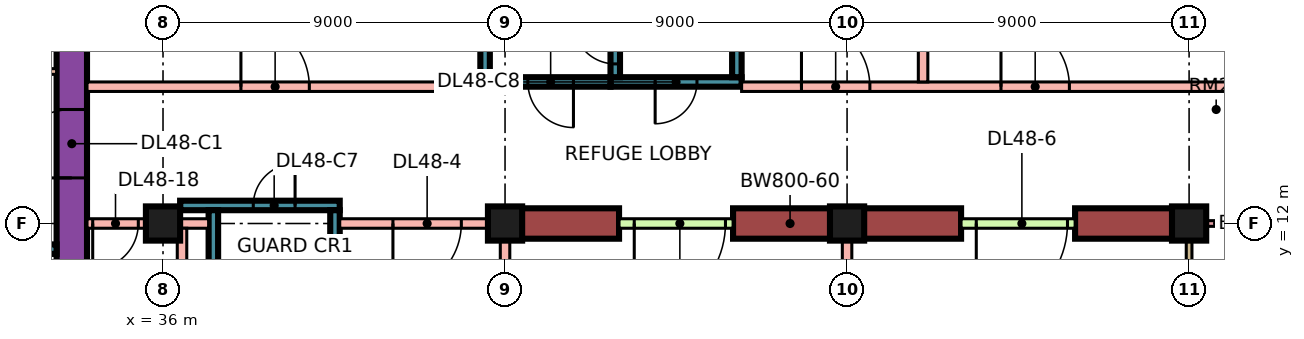
"""IFC4 building model, lengths in metres.
Left out: names, types, materials, properties, quantities, classifications, styles, units other than length and angle.
Written with IfcOpenShell. Run it as: python <this file> out.ifc"""

import sys

from ifc_helpers import new_model, si_unit, direction, frame, frame_2d, origin, origin_2d, place, context, subcontext, project, spatial, rectangle, extrude, element, fill, save


model = new_model("IFC4")
c1 = context("Model", 3, precision=1e-05, world=origin(), true_north=direction((0.0, 1.0)))
c2 = subcontext(c1, "Body", "Model", "MODEL_VIEW")
j1 = project(units=[si_unit("LENGTHUNIT", "METRE"), si_unit("PLANEANGLEUNIT", "RADIAN")], contexts=[c1])
p1 = place(None, origin())
s1 = spatial("IfcSite", under=j1, at=p1, CompositionType="ELEMENT")
p2 = place(p1, origin())
s2 = spatial("IfcBuilding", under=s1, at=p2, CompositionType="ELEMENT")
p3 = place(p2, frame((0.0, 0.0, 206.15)))
s3 = spatial("IfcBuildingStorey", under=s2, at=p3, CompositionType="ELEMENT", Elevation=206.15)
p4 = place(p3, frame((36.0, 12.0, 0.0), z_axis=(0.0, 0.0, 1.0), x_axis=(1.0, 0.0, 0.0)))
e1 = element("IfcColumn", 1, at=p4, inside=s3, PredefinedType="COLUMN", context=c2, shape_type="SweptSolid", body=[
    extrude(rectangle(XDim=0.9, YDim=0.9, at=origin_2d()), origin(), (0.0, 0.0, 1.0), 5.5),
])
p5 = place(p3, frame((45.0, 12.0, 0.0), z_axis=(0.0, 0.0, 1.0), x_axis=(1.0, 0.0, 0.0)))
e2 = element("IfcColumn", 2, at=p5, inside=s3, PredefinedType="COLUMN", context=c2, shape_type="SweptSolid", body=[
    extrude(rectangle(XDim=0.9, YDim=0.9, at=origin_2d()), origin(), (0.0, 0.0, 1.0), 5.5),
])
p6 = place(p3, frame((54.0, 12.0, 0.0), z_axis=(0.0, 0.0, 1.0), x_axis=(1.0, 0.0, 0.0)))
e3 = element("IfcColumn", 3, at=p6, inside=s3, PredefinedType="COLUMN", context=c2, shape_type="SweptSolid", body=[
    extrude(rectangle(XDim=0.9, YDim=0.9, at=origin_2d()), origin(), (0.0, 0.0, 1.0), 5.5),
])
p7 = place(p3, frame((63.0, 12.0, 0.0), z_axis=(0.0, 0.0, 1.0), x_axis=(1.0, 0.0, 0.0)))
e4 = element("IfcColumn", 4, at=p7, inside=s3, PredefinedType="COLUMN", context=c2, shape_type="SweptSolid", body=[
    extrude(rectangle(XDim=0.9, YDim=0.9, at=origin_2d()), origin(), (0.0, 0.0, 1.0), 5.5),
])
p8 = place(p3, frame((33.6, 7.8, 0.0), z_axis=(0.0, 0.0, 1.0), x_axis=(0.0, 1.0, 0.0)))
e5 = element("IfcWall", 5, at=p8, inside=s3, PredefinedType="SHEAR", context=c2, shape_type="SweptSolid", body=[
    extrude(rectangle(XDim=11.4, YDim=0.8, at=frame_2d((5.7, 0.0))), origin(), (0.0, 0.0, 1.0), 5.5),
])
p9 = place(p8, frame((5.4, 0.0, 0.0)))
e6 = element("IfcOpeningElement", 6, at=p9, cuts=e5, PredefinedType="OPENING", context=c2, shape_type="SweptSolid", body=[
    extrude(rectangle(XDim=1.8, YDim=2.4, at=frame_2d((0.9, 1.2))), frame((0.0, 0.41, 0.0), z_axis=(0.0, -1.0, 0.0), x_axis=(1.0, 0.0, 0.0)), (0.0, 0.0, 1.0), 0.82),
])
p10 = place(p3, frame((13.45, 11.325, 0.0), z_axis=(0.0, 0.0, 1.0), x_axis=(1.0, 0.0, 0.0)))
e7 = element("IfcWall", 7, at=p10, inside=s3, PredefinedType="SHEAR", context=c2, shape_type="SweptSolid", body=[
    extrude(rectangle(XDim=19.75, YDim=0.25, at=frame_2d((9.875, 0.0))), origin(), (0.0, 0.0, 1.0), 5.5),
])
p11 = place(p10, frame((11.65, 0.0, 0.0)))
e8 = element("IfcOpeningElement", 8, at=p11, cuts=e7, PredefinedType="OPENING", context=c2, shape_type="SweptSolid", body=[
    extrude(rectangle(XDim=1.2, YDim=2.2, at=frame_2d((0.6, 1.1))), frame((0.0, 0.135, 0.0), z_axis=(0.0, -1.0, 0.0), x_axis=(1.0, 0.0, 0.0)), (0.0, 0.0, 1.0), 0.27),
])
p12 = place(p10, frame((14.4, 0.0, 0.0)))
e9 = element("IfcOpeningElement", 9, at=p12, cuts=e7, PredefinedType="OPENING", context=c2, shape_type="SweptSolid", body=[
    extrude(rectangle(XDim=1.2, YDim=2.2, at=frame_2d((0.6, 1.1))), frame((0.0, 0.135, 0.0), z_axis=(0.0, -1.0, 0.0), x_axis=(1.0, 0.0, 0.0)), (0.0, 0.0, 1.0), 0.27),
])
p13 = place(p10, frame((17.15, 0.0, 0.0)))
e10 = element("IfcOpeningElement", 10, at=p13, cuts=e7, PredefinedType="OPENING", context=c2, shape_type="SweptSolid", body=[
    extrude(rectangle(XDim=1.2, YDim=2.2, at=frame_2d((0.6, 1.1))), frame((0.0, 0.135, 0.0), z_axis=(0.0, -1.0, 0.0), x_axis=(1.0, 0.0, 0.0)), (0.0, 0.0, 1.0), 0.27),
])
p14 = place(p10, frame((1.55, 0.0, 0.0)))
e11 = element("IfcOpeningElement", 11, at=p14, cuts=e7, PredefinedType="OPENING", context=c2, shape_type="SweptSolid", body=[
    extrude(rectangle(XDim=0.9, YDim=2.1, at=frame_2d((0.45, 1.05))), frame((0.0, 0.135, 0.0), z_axis=(0.0, -1.0, 0.0), x_axis=(1.0, 0.0, 0.0)), (0.0, 0.0, 1.0), 0.27),
])
p15 = place(p10, frame((5.05, 0.0, 0.0)))
e12 = element("IfcOpeningElement", 12, at=p15, cuts=e7, PredefinedType="OPENING", context=c2, shape_type="SweptSolid", body=[
    extrude(rectangle(XDim=0.9, YDim=2.1, at=frame_2d((0.45, 1.05))), frame((0.0, 0.135, 0.0), z_axis=(0.0, -1.0, 0.0), x_axis=(1.0, 0.0, 0.0)), (0.0, 0.0, 1.0), 0.27),
])
p16 = place(p10, frame((8.425, 0.0, 0.0)))
e13 = element("IfcOpeningElement", 13, at=p16, cuts=e7, PredefinedType="OPENING", context=c2, shape_type="SweptSolid", body=[
    extrude(rectangle(XDim=0.9, YDim=2.1, at=frame_2d((0.45, 1.05))), frame((0.0, 0.135, 0.0), z_axis=(0.0, -1.0, 0.0), x_axis=(1.0, 0.0, 0.0)), (0.0, 0.0, 1.0), 0.27),
])
p17 = place(p3, frame((36.45, 12.475, 0.0), z_axis=(0.0, 0.0, 1.0), x_axis=(1.0, 0.0, 0.0)))
e14 = element("IfcWall", 14, at=p17, inside=s3, PredefinedType="SHEAR", context=c2, shape_type="SweptSolid", body=[
    extrude(rectangle(XDim=4.2, YDim=0.25, at=frame_2d((2.1, 0.0))), origin(), (0.0, 0.0, 1.0), 5.5),
])
p18 = place(p17, frame((1.925, 0.0, 0.0)))
e15 = element("IfcOpeningElement", 15, at=p18, cuts=e14, PredefinedType="OPENING", context=c2, shape_type="SweptSolid", body=[
    extrude(rectangle(XDim=1.1, YDim=2.2, at=frame_2d((0.55, 1.1))), frame((0.0, 0.135, 0.0), z_axis=(0.0, -1.0, 0.0), x_axis=(1.0, 0.0, 0.0)), (0.0, 0.0, 1.0), 0.27),
])
for number, where, z_axis, x_axis in (
    (16, (37.325, 5.85, 0.0), (0.0, 0.0, 1.0), (0.0, 1.0, 0.0)),
    (17, (40.525, 5.85, 0.0), (0.0, 0.0, 1.0), (0.0, 1.0, 0.0)),
):
    element("IfcWall", number, at=place(p3, frame(where, z_axis=z_axis, x_axis=x_axis)), inside=s3, PredefinedType="SHEAR", context=c2, shape_type="SweptSolid", body=[
        extrude(rectangle(XDim=6.5, YDim=0.25, at=frame_2d((3.25, 0.0))), origin(), (0.0, 0.0, 1.0), 5.5),
    ])
p19 = place(p3, frame((47.775, 15.725, 0.0), z_axis=(0.0, 0.0, 1.0), x_axis=(1.0, 0.0, 0.0)))
e18 = element("IfcWall", 18, at=p19, inside=s3, PredefinedType="SHEAR", context=c2, shape_type="SweptSolid", body=[
    extrude(rectangle(XDim=3.45, YDim=0.25, at=frame_2d((1.725, 0.0))), origin(), (0.0, 0.0, 1.0), 5.5),
])
p20 = place(p19, frame((1.175, 0.0, 0.0)))
e19 = element("IfcOpeningElement", 19, at=p20, cuts=e18, PredefinedType="OPENING", context=c2, shape_type="SweptSolid", body=[
    extrude(rectangle(XDim=1.1, YDim=2.2, at=frame_2d((0.55, 1.1))), frame((0.0, 0.135, 0.0), z_axis=(0.0, -1.0, 0.0), x_axis=(1.0, 0.0, 0.0)), (0.0, 0.0, 1.0), 0.27),
])
p21 = place(p3, frame((47.9, 15.85, 0.0), z_axis=(0.0, 0.0, 1.0), x_axis=(0.0, 1.0, 0.0)))
e20 = element("IfcWall", 20, at=p21, inside=s3, PredefinedType="SHEAR", context=c2, shape_type="SweptSolid", body=[
    extrude(rectangle(XDim=6.5, YDim=0.25, at=frame_2d((3.25, 0.0))), origin(), (0.0, 0.0, 1.0), 5.5),
])
p22 = place(p21, frame((0.35, 0.0, 0.0)))
e21 = element("IfcOpeningElement", 21, at=p22, cuts=e20, PredefinedType="OPENING", context=c2, shape_type="SweptSolid", body=[
    extrude(rectangle(XDim=1.1, YDim=2.2, at=frame_2d((0.55, 1.1))), frame((0.0, 0.135, 0.0), z_axis=(0.0, -1.0, 0.0), x_axis=(1.0, 0.0, 0.0)), (0.0, 0.0, 1.0), 0.27),
])
p23 = place(p3, frame((51.1, 15.85, 0.0), z_axis=(0.0, 0.0, 1.0), x_axis=(0.0, 1.0, 0.0)))
e22 = element("IfcWall", 22, at=p23, inside=s3, PredefinedType="SHEAR", context=c2, shape_type="SweptSolid", body=[
    extrude(rectangle(XDim=6.5, YDim=0.25, at=frame_2d((3.25, 0.0))), origin(), (0.0, 0.0, 1.0), 5.5),
])
p24 = place(p3, frame((44.35, 15.725, 0.0), z_axis=(0.0, 0.0, 1.0), x_axis=(1.0, 0.0, 0.0)))
e23 = element("IfcWall", 23, at=p24, inside=s3, PredefinedType="SHEAR", context=c2, shape_type="SweptSolid", body=[
    extrude(rectangle(XDim=3.425, YDim=0.25, at=frame_2d((1.712, 0.0))), origin(), (0.0, 0.0, 1.0), 5.5),
])
p25 = place(p24, frame((1.25, 0.0, 0.0)))
e24 = element("IfcOpeningElement", 24, at=p25, cuts=e23, PredefinedType="OPENING", context=c2, shape_type="SweptSolid", body=[
    extrude(rectangle(XDim=1.2, YDim=2.2, at=frame_2d((0.6, 1.1))), frame((0.0, 0.135, 0.0), z_axis=(0.0, -1.0, 0.0), x_axis=(1.0, 0.0, 0.0)), (0.0, 0.0, 1.0), 0.27),
])
p26 = place(p3, frame((44.475, 15.85, 0.0), z_axis=(0.0, 0.0, 1.0), x_axis=(0.0, 1.0, 0.0)))
e25 = element("IfcWall", 25, at=p26, inside=s3, PredefinedType="SHEAR", context=c2, shape_type="SweptSolid", body=[
    extrude(rectangle(XDim=6.5, YDim=0.25, at=frame_2d((3.25, 0.0))), origin(), (0.0, 0.0, 1.0), 5.5),
])
p27 = place(p26, frame((1.75, 0.0, 0.0)))
e26 = element("IfcOpeningElement", 26, at=p27, cuts=e25, PredefinedType="OPENING", context=c2, shape_type="SweptSolid", body=[
    extrude(rectangle(XDim=1.1, YDim=2.2, at=frame_2d((0.55, 1.1))), frame((0.0, 0.135, 0.0), z_axis=(0.0, -1.0, 0.0), x_axis=(1.0, 0.0, 0.0)), (0.0, 0.0, 1.0), 0.27),
])
p28 = place(p26, frame((4.3, 0.0, 0.0)))
e27 = element("IfcOpeningElement", 27, at=p28, cuts=e25, PredefinedType="OPENING", context=c2, shape_type="SweptSolid", body=[
    extrude(rectangle(XDim=1.1, YDim=2.2, at=frame_2d((0.55, 1.1))), frame((0.0, 0.135, 0.0), z_axis=(0.0, -1.0, 0.0), x_axis=(1.0, 0.0, 0.0)), (0.0, 0.0, 1.0), 0.27),
])
e28 = element("IfcWall", 28, at=p5, inside=s3, PredefinedType="SHEAR", context=c2, shape_type="SweptSolid", body=[
    extrude(rectangle(XDim=3.0, YDim=0.8, at=frame_2d((1.5, 0.0))), origin(), (0.0, 0.0, 1.0), 5.1),
])
p29 = place(p3, frame((51.0, 12.0, 0.0), z_axis=(0.0, 0.0, 1.0), x_axis=(1.0, 0.0, 0.0)))
e29 = element("IfcWall", 29, at=p29, inside=s3, PredefinedType="SHEAR", context=c2, shape_type="SweptSolid", body=[
    extrude(rectangle(XDim=3.0, YDim=0.8, at=frame_2d((1.5, 0.0))), origin(), (0.0, 0.0, 1.0), 5.1),
])
e30 = element("IfcWall", 30, at=p6, inside=s3, PredefinedType="SHEAR", context=c2, shape_type="SweptSolid", body=[
    extrude(rectangle(XDim=3.0, YDim=0.8, at=frame_2d((1.5, 0.0))), origin(), (0.0, 0.0, 1.0), 5.1),
])
p30 = place(p3, frame((60.0, 12.0, 0.0), z_axis=(0.0, 0.0, 1.0), x_axis=(1.0, 0.0, 0.0)))
e31 = element("IfcWall", 31, at=p30, inside=s3, PredefinedType="SHEAR", context=c2, shape_type="SweptSolid", body=[
    extrude(rectangle(XDim=3.0, YDim=0.8, at=frame_2d((1.5, 0.0))), origin(), (0.0, 0.0, 1.0), 5.1),
])
p31 = place(p3, frame((63.0, 1.575, 0.0), z_axis=(0.0, 0.0, 1.0), x_axis=(0.0, 1.0, 0.0)))
e32 = element("IfcWall", 32, at=p31, inside=s3, PredefinedType="SOLIDWALL", context=c2, shape_type="SweptSolid", body=[
    extrude(rectangle(XDim=10.35, YDim=0.15, at=frame_2d((5.175, 0.0))), origin(), (0.0, 0.0, 1.0), 5.1),
])
p32 = place(p31, frame((3.438, 0.0, 0.45)))
e33 = element("IfcOpeningElement", 33, at=p32, cuts=e32, PredefinedType="OPENING", context=c2, shape_type="SweptSolid", body=[
    extrude(rectangle(XDim=3.0, YDim=3.6, at=frame_2d((1.5, 1.8))), frame((0.0, 0.085, 0.0), z_axis=(0.0, -1.0, 0.0), x_axis=(1.0, 0.0, 0.0)), (0.0, 0.0, 1.0), 0.17),
])
p33 = place(p3, frame((64.5, 12.0, 0.0), z_axis=(0.0, 0.0, 1.0), x_axis=(-1.0, 0.0, 0.0)))
e34 = element("IfcWall", 34, at=p33, inside=s3, PredefinedType="SOLIDWALL", context=c2, shape_type="SweptSolid", body=[
    extrude(rectangle(XDim=1.5, YDim=0.15, at=frame_2d((0.75, 0.0))), origin(), (0.0, 0.0, 1.0), 5.1),
])
p34 = place(p3, frame((31.2, 16.0, 0.0), z_axis=(0.0, 0.0, 1.0), x_axis=(1.0, 0.0, 0.0)))
e35 = element("IfcWall", 35, at=p34, inside=s3, PredefinedType="PARTITIONING", context=c2, shape_type="SweptSolid", body=[
    extrude(rectangle(XDim=2.0, YDim=0.15, at=frame_2d((1.0, 0.0))), origin(), (0.0, 0.0, 1.0), 5.1),
])
p35 = place(p3, frame((34.0, 12.0, 0.0), z_axis=(0.0, 0.0, 1.0), x_axis=(1.0, 0.0, 0.0)))
e36 = element("IfcWall", 36, at=p35, inside=s3, PredefinedType="PARTITIONING", context=c2, shape_type="SweptSolid", body=[
    extrude(rectangle(XDim=3.2, YDim=0.25, at=frame_2d((1.6, 0.0))), origin(), (0.0, 0.0, 1.0), 5.1),
])
p36 = place(p35, frame((0.15, 0.0, 0.0)))
e37 = element("IfcOpeningElement", 37, at=p36, cuts=e36, PredefinedType="OPENING", context=c2, shape_type="SweptSolid", body=[
    extrude(rectangle(XDim=1.2, YDim=2.1, at=frame_2d((0.6, 1.05))), frame((0.0, 0.135, 0.0), z_axis=(0.0, -1.0, 0.0), x_axis=(1.0, 0.0, 0.0)), (0.0, 0.0, 1.0), 0.27),
])
p37 = place(p3, frame((34.0, 15.6, 0.0), z_axis=(0.0, 0.0, 1.0), x_axis=(1.0, 0.0, 0.0)))
e38 = element("IfcWall", 38, at=p37, inside=s3, PredefinedType="PARTITIONING", context=c2, shape_type="SweptSolid", body=[
    extrude(rectangle(XDim=10.35, YDim=0.25, at=frame_2d((5.175, 0.0))), origin(), (0.0, 0.0, 1.0), 5.1),
])
p38 = place(p37, frame((4.05, 0.0, 0.0)))
e39 = element("IfcOpeningElement", 39, at=p38, cuts=e38, PredefinedType="OPENING", context=c2, shape_type="SweptSolid", body=[
    extrude(rectangle(XDim=1.8, YDim=2.1, at=frame_2d((0.9, 1.05))), frame((0.0, 0.135, 0.0), z_axis=(0.0, -1.0, 0.0), x_axis=(1.0, 0.0, 0.0)), (0.0, 0.0, 1.0), 0.27),
])
p39 = place(p3, frame((36.5, 6.875, 0.0), z_axis=(0.0, 0.0, 1.0), x_axis=(0.0, 1.0, 0.0)))
e40 = element("IfcWall", 40, at=p39, inside=s3, PredefinedType="PARTITIONING", context=c2, shape_type="SweptSolid", body=[
    extrude(rectangle(XDim=5.0, YDim=0.25, at=frame_2d((2.5, 0.0))), origin(), (0.0, 0.0, 1.0), 5.1),
])
p40 = place(p3, frame((40.65, 12.0, 0.0), z_axis=(0.0, 0.0, 1.0), x_axis=(1.0, 0.0, 0.0)))
e41 = element("IfcWall", 41, at=p40, inside=s3, PredefinedType="PARTITIONING", context=c2, shape_type="SweptSolid", body=[
    extrude(rectangle(XDim=4.225, YDim=0.25, at=frame_2d((2.113, 0.0))), origin(), (0.0, 0.0, 1.0), 5.1),
])
p41 = place(p40, frame((1.4, 0.0, 0.0)))
e42 = element("IfcOpeningElement", 42, at=p41, cuts=e41, PredefinedType="OPENING", context=c2, shape_type="SweptSolid", body=[
    extrude(rectangle(XDim=1.8, YDim=2.1, at=frame_2d((0.9, 1.05))), frame((0.0, 0.135, 0.0), z_axis=(0.0, -1.0, 0.0), x_axis=(1.0, 0.0, 0.0)), (0.0, 0.0, 1.0), 0.27),
])
p42 = place(p3, frame((45.0, 0.0, 0.0), z_axis=(0.0, 0.0, 1.0), x_axis=(0.0, 1.0, 0.0)))
e43 = element("IfcWall", 43, at=p42, inside=s3, PredefinedType="PARTITIONING", context=c2, shape_type="SweptSolid", body=[
    extrude(rectangle(XDim=12.125, YDim=0.25, at=frame_2d((6.062, 0.0))), origin(), (0.0, 0.0, 1.0), 5.1),
])
p43 = place(p3, frame((47.999, 12.0, 0.0), z_axis=(0.0, 0.0, 1.0), x_axis=(1.0, 0.0, 0.0)))
e44 = element("IfcWall", 44, at=p43, inside=s3, PredefinedType="PARTITIONING", context=c2, shape_type="SweptSolid", body=[
    extrude(rectangle(XDim=3.002, YDim=0.25, at=frame_2d((1.501, 0.0))), origin(), (0.0, 0.0, 1.0), 3.05),
])
p44 = place(p43, frame((0.401, 0.0, 0.0)))
e45 = element("IfcOpeningElement", 45, at=p44, cuts=e44, PredefinedType="OPENING", context=c2, shape_type="SweptSolid", body=[
    extrude(rectangle(XDim=2.4, YDim=2.1, at=frame_2d((1.2, 1.05))), frame((0.0, 0.135, 0.0), z_axis=(0.0, -1.0, 0.0), x_axis=(1.0, 0.0, 0.0)), (0.0, 0.0, 1.0), 0.27),
])
p45 = place(p3, frame((51.225, 15.6, 0.0), z_axis=(0.0, 0.0, 1.0), x_axis=(1.0, 0.0, 0.0)))
e46 = element("IfcWall", 46, at=p45, inside=s3, PredefinedType="PARTITIONING", context=c2, shape_type="SweptSolid", body=[
    extrude(rectangle(XDim=13.125, YDim=0.25, at=frame_2d((6.562, 0.0))), origin(), (0.0, 0.0, 1.0), 5.1),
])
p46 = place(p45, frame((1.575, 0.0, 0.0)))
e47 = element("IfcOpeningElement", 47, at=p46, cuts=e46, PredefinedType="OPENING", context=c2, shape_type="SweptSolid", body=[
    extrude(rectangle(XDim=1.8, YDim=2.1, at=frame_2d((0.9, 1.05))), frame((0.0, 0.135, 0.0), z_axis=(0.0, -1.0, 0.0), x_axis=(1.0, 0.0, 0.0)), (0.0, 0.0, 1.0), 0.27),
])
p47 = place(p45, frame((6.825, 0.0, 0.0)))
e48 = element("IfcOpeningElement", 48, at=p47, cuts=e46, PredefinedType="OPENING", context=c2, shape_type="SweptSolid", body=[
    extrude(rectangle(XDim=1.8, YDim=2.1, at=frame_2d((0.9, 1.05))), frame((0.0, 0.135, 0.0), z_axis=(0.0, -1.0, 0.0), x_axis=(1.0, 0.0, 0.0)), (0.0, 0.0, 1.0), 0.27),
])
p48 = place(p3, frame((54.0, 0.074, 0.0), z_axis=(0.0, 0.0, 1.0), x_axis=(0.0, 1.0, 0.0)))
e49 = element("IfcWall", 49, at=p48, inside=s3, PredefinedType="PARTITIONING", context=c2, shape_type="SweptSolid", body=[
    extrude(rectangle(XDim=11.527, YDim=0.25, at=frame_2d((5.764, 0.0))), origin(), (0.0, 0.0, 1.0), 5.1),
])
p49 = place(p3, frame((56.0, 15.725, 0.0), z_axis=(0.0, 0.0, 1.0), x_axis=(0.0, 1.0, 0.0)))
e50 = element("IfcWall", 50, at=p49, inside=s3, PredefinedType="PARTITIONING", context=c2, shape_type="SweptSolid", body=[
    extrude(rectangle(XDim=8.201, YDim=0.25, at=frame_2d((4.101, 0.0))), origin(), (0.0, 0.0, 1.0), 5.1),
])
p50 = place(p3, frame((56.999, 12.0, 0.0), z_axis=(0.0, 0.0, 1.0), x_axis=(1.0, 0.0, 0.0)))
e51 = element("IfcWall", 51, at=p50, inside=s3, PredefinedType="PARTITIONING", context=c2, shape_type="SweptSolid", body=[
    extrude(rectangle(XDim=3.002, YDim=0.25, at=frame_2d((1.501, 0.0))), origin(), (0.0, 0.0, 1.0), 3.05),
])
p51 = place(p50, frame((0.401, 0.0, 0.0)))
e52 = element("IfcOpeningElement", 52, at=p51, cuts=e51, PredefinedType="OPENING", context=c2, shape_type="SweptSolid", body=[
    extrude(rectangle(XDim=2.4, YDim=2.1, at=frame_2d((1.2, 1.05))), frame((0.0, 0.135, 0.0), z_axis=(0.0, -1.0, 0.0), x_axis=(1.0, 0.0, 0.0)), (0.0, 0.0, 1.0), 0.27),
])
p52 = place(p9, origin())
e53 = element("IfcDoor", 53, at=p52, inside=s3, OperationType="DOUBLE_DOOR_SINGLE_SWING", PredefinedType="DOOR", context=c2, shape_type="SweptSolid", body=[
    extrude(rectangle(XDim=1.8, YDim=2.4, at=frame_2d((0.9, 1.2))), frame((0.0, 0.025, 0.0), z_axis=(0.0, -1.0, 0.0), x_axis=(1.0, 0.0, 0.0)), (0.0, 0.0, 1.0), 0.05),
])
fill(e6, e53)
p53 = place(p18, frame((1.1, 0.0, 0.0), z_axis=(0.0, 0.0, 1.0), x_axis=(-1.0, 0.0, 0.0)))
e54 = element("IfcDoor", 54, at=p53, inside=s3, OperationType="SINGLE_SWING_RIGHT", PredefinedType="DOOR", context=c2, shape_type="SweptSolid", body=[
    extrude(rectangle(XDim=1.1, YDim=2.2, at=frame_2d((0.55, 1.1))), frame((0.0, 0.025, 0.0), z_axis=(0.0, -1.0, 0.0), x_axis=(1.0, 0.0, 0.0)), (0.0, 0.0, 1.0), 0.05),
])
fill(e15, e54)
p54 = place(p20, frame((1.1, 0.0, 0.0), z_axis=(0.0, 0.0, 1.0), x_axis=(-1.0, 0.0, 0.0)))
e55 = element("IfcDoor", 55, at=p54, inside=s3, OperationType="SINGLE_SWING_LEFT", PredefinedType="DOOR", context=c2, shape_type="SweptSolid", body=[
    extrude(rectangle(XDim=1.1, YDim=2.2, at=frame_2d((0.55, 1.1))), frame((0.0, 0.025, 0.0), z_axis=(0.0, -1.0, 0.0), x_axis=(1.0, 0.0, 0.0)), (0.0, 0.0, 1.0), 0.05),
])
fill(e19, e55)
p55 = place(p25, origin())
e56 = element("IfcDoor", 56, at=p55, inside=s3, OperationType="SINGLE_SWING_RIGHT", PredefinedType="DOOR", context=c2, shape_type="SweptSolid", body=[
    extrude(rectangle(XDim=1.2, YDim=2.2, at=frame_2d((0.6, 1.1))), frame((0.0, 0.025, 0.0), z_axis=(0.0, -1.0, 0.0), x_axis=(1.0, 0.0, 0.0)), (0.0, 0.0, 1.0), 0.05),
])
fill(e24, e56)
p56 = place(p22, frame((1.1, 0.0, 0.0), z_axis=(0.0, 0.0, 1.0), x_axis=(-1.0, 0.0, 0.0)))
e57 = element("IfcDoor", 57, at=p56, inside=s3, OperationType="SINGLE_SWING_RIGHT", PredefinedType="DOOR", context=c2, shape_type="SweptSolid", body=[
    extrude(rectangle(XDim=1.1, YDim=2.2, at=frame_2d((0.55, 1.1))), frame((0.0, 0.025, 0.0), z_axis=(0.0, -1.0, 0.0), x_axis=(1.0, 0.0, 0.0)), (0.0, 0.0, 1.0), 0.05),
])
fill(e21, e57)
p57 = place(p38, origin())
e58 = element("IfcDoor", 58, at=p57, inside=s3, OperationType="DOUBLE_DOOR_SINGLE_SWING", PredefinedType="DOOR", context=c2, shape_type="SweptSolid", body=[
    extrude(rectangle(XDim=1.8, YDim=2.1, at=frame_2d((0.9, 1.05))), frame((0.0, 0.025, 0.0), z_axis=(0.0, -1.0, 0.0), x_axis=(1.0, 0.0, 0.0)), (0.0, 0.0, 1.0), 0.05),
])
fill(e39, e58)
p58 = place(p46, origin())
e59 = element("IfcDoor", 59, at=p58, inside=s3, OperationType="DOUBLE_DOOR_SINGLE_SWING", PredefinedType="DOOR", context=c2, shape_type="SweptSolid", body=[
    extrude(rectangle(XDim=1.8, YDim=2.1, at=frame_2d((0.9, 1.05))), frame((0.0, 0.025, 0.0), z_axis=(0.0, -1.0, 0.0), x_axis=(1.0, 0.0, 0.0)), (0.0, 0.0, 1.0), 0.05),
])
fill(e47, e59)
p59 = place(p47, origin())
e60 = element("IfcDoor", 60, at=p59, inside=s3, OperationType="DOUBLE_DOOR_SINGLE_SWING", PredefinedType="DOOR", context=c2, shape_type="SweptSolid", body=[
    extrude(rectangle(XDim=1.8, YDim=2.1, at=frame_2d((0.9, 1.05))), frame((0.0, 0.025, 0.0), z_axis=(0.0, -1.0, 0.0), x_axis=(1.0, 0.0, 0.0)), (0.0, 0.0, 1.0), 0.05),
])
fill(e48, e60)
p60 = place(p41, frame((1.8, 0.0, 0.0), z_axis=(0.0, 0.0, 1.0), x_axis=(-1.0, 0.0, 0.0)))
e61 = element("IfcDoor", 61, at=p60, inside=s3, OperationType="DOUBLE_DOOR_SINGLE_SWING", PredefinedType="DOOR", context=c2, shape_type="SweptSolid", body=[
    extrude(rectangle(XDim=1.8, YDim=2.1, at=frame_2d((0.9, 1.05))), frame((0.0, 0.025, 0.0), z_axis=(0.0, -1.0, 0.0), x_axis=(1.0, 0.0, 0.0)), (0.0, 0.0, 1.0), 0.05),
])
fill(e42, e61)
p61 = place(p44, frame((2.4, 0.0, 0.0), z_axis=(0.0, 0.0, 1.0), x_axis=(-1.0, 0.0, 0.0)))
e62 = element("IfcDoor", 62, at=p61, inside=s3, OperationType="DOUBLE_DOOR_SINGLE_SWING", PredefinedType="DOOR", context=c2, shape_type="SweptSolid", body=[
    extrude(rectangle(XDim=2.4, YDim=2.1, at=frame_2d((1.2, 1.05))), frame((0.0, 0.025, 0.0), z_axis=(0.0, -1.0, 0.0), x_axis=(1.0, 0.0, 0.0)), (0.0, 0.0, 1.0), 0.05),
])
fill(e45, e62)
p62 = place(p51, frame((2.4, 0.0, 0.0), z_axis=(0.0, 0.0, 1.0), x_axis=(-1.0, 0.0, 0.0)))
e63 = element("IfcDoor", 63, at=p62, inside=s3, OperationType="DOUBLE_DOOR_SINGLE_SWING", PredefinedType="DOOR", context=c2, shape_type="SweptSolid", body=[
    extrude(rectangle(XDim=2.4, YDim=2.1, at=frame_2d((1.2, 1.05))), frame((0.0, 0.025, 0.0), z_axis=(0.0, -1.0, 0.0), x_axis=(1.0, 0.0, 0.0)), (0.0, 0.0, 1.0), 0.05),
])
fill(e52, e63)
p63 = place(p36, frame((1.2, 0.0, 0.0), z_axis=(0.0, 0.0, 1.0), x_axis=(-1.0, 0.0, 0.0)))
e64 = element("IfcDoor", 64, at=p63, inside=s3, OperationType="SINGLE_SWING_LEFT", PredefinedType="DOOR", context=c2, shape_type="SweptSolid", body=[
    extrude(rectangle(XDim=1.2, YDim=2.1, at=frame_2d((0.6, 1.05))), frame((0.0, 0.025, 0.0), z_axis=(0.0, -1.0, 0.0), x_axis=(1.0, 0.0, 0.0)), (0.0, 0.0, 1.0), 0.05),
])
fill(e37, e64)
save(model, sys.argv[1])
